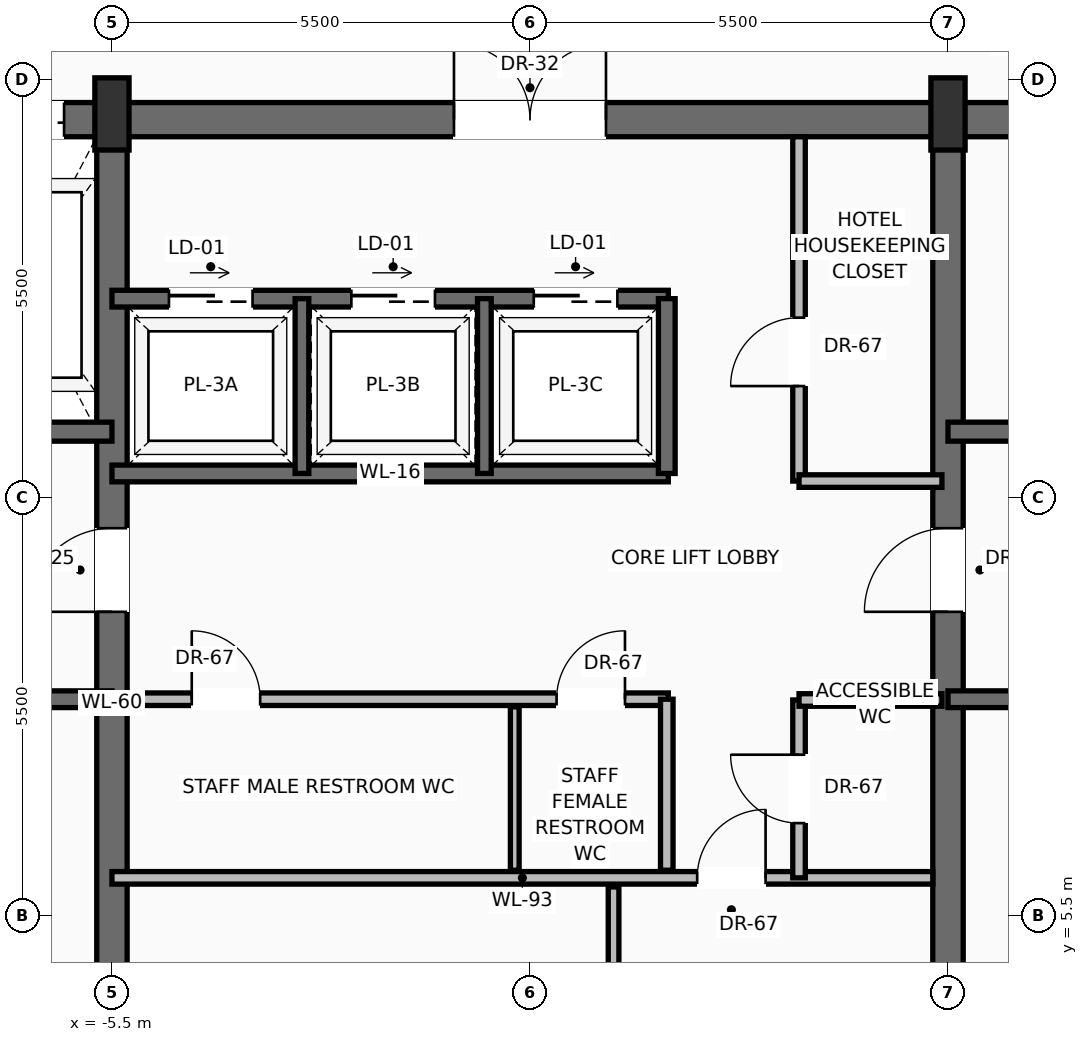
"""IFC4 building model, lengths in metres.
Left out: names, types, materials, properties, quantities, classifications, styles, units other than length and angle.
Written with IfcOpenShell. Run it as: python <this file> out.ifc"""

import sys

from ifc_helpers import new_model, si_unit, direction, frame, frame_2d, origin, origin_2d, place, context, subcontext, project, spatial, rectangle, extrude, source, transform, mapped, element, fill, save


model = new_model("IFC4")
c1 = context("Model", 3, precision=1e-05, world=origin(), true_north=direction((0.0, 1.0)))
c2 = subcontext(c1, "Body", "Model", "MODEL_VIEW")
j1 = project(units=[si_unit("LENGTHUNIT", "METRE"), si_unit("PLANEANGLEUNIT", "RADIAN")], contexts=[c1])
p1 = place(None, origin())
s1 = spatial("IfcSite", under=j1, at=p1, CompositionType="ELEMENT")
p2 = place(p1, origin())
s2 = spatial("IfcBuilding", under=s1, at=p2, CompositionType="ELEMENT")
p3 = place(p2, frame((0.0, 0.0, 266.1)))
s3 = spatial("IfcBuildingStorey", under=s2, at=p3, CompositionType="ELEMENT", Elevation=266.1)
p4 = place(p3, frame((-10.6, 15.975, 0.0), z_axis=(0.0, 0.0, 1.0), x_axis=(1.0, 0.0, 0.0)))
e1 = element("IfcWall", 1, at=p4, inside=s3, PredefinedType="SHEAR", context=c2, shape_type="SweptSolid", body=[
    extrude(rectangle(XDim=21.2, YDim=0.45, at=frame_2d((10.6, 0.0))), origin(), (0.0, 0.0, 1.0), 3.24),
])
p5 = place(p4, frame((3.17, 0.0, 0.0)))
e2 = element("IfcOpeningElement", 2, at=p5, cuts=e1, PredefinedType="OPENING", context=c2, shape_type="SweptSolid", body=[
    extrude(rectangle(XDim=1.3, YDim=2.3, at=frame_2d((0.65, 1.15))), frame((0.0, 0.235, 0.0), z_axis=(0.0, -1.0, 0.0), x_axis=(1.0, 0.0, 0.0)), (0.0, 0.0, 1.0), 0.47),
])
p6 = place(p4, frame((9.6, 0.0, 0.0)))
e3 = element("IfcOpeningElement", 3, at=p6, cuts=e1, PredefinedType="OPENING", context=c2, shape_type="SweptSolid", body=[
    extrude(rectangle(XDim=2.0, YDim=2.4, at=frame_2d((1.0, 1.2))), frame((0.0, 0.235, 0.0), z_axis=(0.0, -1.0, 0.0), x_axis=(1.0, 0.0, 0.0)), (0.0, 0.0, 1.0), 0.47),
])
p7 = place(p3, frame((-5.5, 0.625, 0.0), z_axis=(0.0, 0.0, 1.0), x_axis=(0.0, 1.0, 0.0)))
e4 = element("IfcWall", 4, at=p7, inside=s3, PredefinedType="SHEAR", context=c2, shape_type="SweptSolid", body=[
    extrude(rectangle(XDim=15.35, YDim=0.4, at=frame_2d((7.675, 0.0))), origin(), (0.0, 0.0, 1.0), 3.24),
])
p8 = place(p7, frame((8.875, 0.0, 0.0)))
e5 = element("IfcOpeningElement", 5, at=p8, cuts=e4, PredefinedType="OPENING", context=c2, shape_type="SweptSolid", body=[
    extrude(rectangle(XDim=1.1, YDim=2.2, at=frame_2d((0.55, 1.1))), frame((0.0, 0.21, 0.0), z_axis=(0.0, -1.0, 0.0), x_axis=(1.0, 0.0, 0.0)), (0.0, 0.0, 1.0), 0.42),
])
p9 = place(p3, frame((5.5, 0.625, 0.0), z_axis=(0.0, 0.0, 1.0), x_axis=(0.0, 1.0, 0.0)))
e6 = element("IfcWall", 6, at=p9, inside=s3, PredefinedType="SHEAR", context=c2, shape_type="SweptSolid", body=[
    extrude(rectangle(XDim=15.35, YDim=0.4, at=frame_2d((7.675, 0.0))), origin(), (0.0, 0.0, 1.0), 3.24),
])
p10 = place(p9, frame((8.875, 0.0, 0.0)))
e7 = element("IfcOpeningElement", 7, at=p10, cuts=e6, PredefinedType="OPENING", context=c2, shape_type="SweptSolid", body=[
    extrude(rectangle(XDim=1.1, YDim=2.2, at=frame_2d((0.55, 1.1))), frame((0.0, 0.21, 0.0), z_axis=(0.0, -1.0, 0.0), x_axis=(1.0, 0.0, 0.0)), (0.0, 0.0, 1.0), 0.42),
])
m1 = source(origin(), c2, "Body", "SweptSolid", [
    extrude(rectangle(XDim=0.45, YDim=0.95, at=origin_2d()), origin(), (0.0, 0.0, 1.0), 3.45),
])
for number, where, z_axis, x_axis in (
    (8, (-5.5, 16.05, 0.0), (0.0, 0.0, 1.0), (1.0, 0.0, 0.0)),
    (9, (5.5, 16.05, 0.0), (0.0, 0.0, 1.0), (1.0, 0.0, 0.0)),
):
    element("IfcColumn", number, at=place(p3, frame(where, z_axis=z_axis, x_axis=x_axis)), inside=s3, PredefinedType="PILASTER", context=c2, shape_type="MappedRepresentation", body=[
        mapped(m1, transform((0.0, 0.0, 0.0), scale=1.0)),
    ])
p11 = place(p3, frame((-5.5, 8.35, 0.0), z_axis=(0.0, 0.0, 1.0), x_axis=(-1.0, 0.0, 0.0)))
e10 = element("IfcWall", 10, at=p11, inside=s3, PredefinedType="SOLIDWALL", context=c2, shape_type="SweptSolid", body=[
    extrude(rectangle(XDim=4.65, YDim=0.22, at=frame_2d((2.325, 0.0))), origin(), (0.0, 0.0, 1.0), 3.24),
])
p12 = place(p11, frame((2.5, 0.0, 0.0)))
e11 = element("IfcOpeningElement", 11, at=p12, cuts=e10, PredefinedType="OPENING", context=c2, shape_type="SweptSolid", body=[
    extrude(rectangle(XDim=1.15, YDim=2.2, at=frame_2d((0.575, 1.1))), frame((0.0, 0.12, 0.0), z_axis=(0.0, -1.0, 0.0), x_axis=(1.0, 0.0, 0.0)), (0.0, 0.0, 1.0), 0.24),
])
p13 = place(p3, frame((-5.5, 11.87, 0.0), z_axis=(0.0, 0.0, 1.0), x_axis=(-1.0, 0.0, 0.0)))
e12 = element("IfcWall", 12, at=p13, inside=s3, PredefinedType="SOLIDWALL", context=c2, shape_type="SweptSolid", body=[
    extrude(rectangle(XDim=4.65, YDim=0.25, at=frame_2d((2.325, 0.0))), origin(), (0.0, 0.0, 1.0), 3.24),
])
p14 = place(p13, frame((2.95, 0.0, 0.0)))
e13 = element("IfcOpeningElement", 13, at=p14, cuts=e12, PredefinedType="OPENING", context=c2, shape_type="SweptSolid", body=[
    extrude(rectangle(XDim=1.2, YDim=2.25, at=frame_2d((0.6, 1.125))), frame((0.0, 0.135, 0.0), z_axis=(0.0, -1.0, 0.0), x_axis=(1.0, 0.0, 0.0)), (0.0, 0.0, 1.0), 0.27),
])
p15 = place(p3, frame((10.15, 8.35, 0.0), z_axis=(0.0, 0.0, 1.0), x_axis=(-1.0, 0.0, 0.0)))
e14 = element("IfcWall", 14, at=p15, inside=s3, PredefinedType="SOLIDWALL", context=c2, shape_type="SweptSolid", body=[
    extrude(rectangle(XDim=4.65, YDim=0.22, at=frame_2d((2.325, 0.0))), origin(), (0.0, 0.0, 1.0), 3.24),
])
p16 = place(p15, frame((1.0, 0.0, 0.0)))
e15 = element("IfcOpeningElement", 15, at=p16, cuts=e14, PredefinedType="OPENING", context=c2, shape_type="SweptSolid", body=[
    extrude(rectangle(XDim=1.15, YDim=2.2, at=frame_2d((0.575, 1.1))), frame((0.0, 0.12, 0.0), z_axis=(0.0, -1.0, 0.0), x_axis=(1.0, 0.0, 0.0)), (0.0, 0.0, 1.0), 0.24),
])
p17 = place(p3, frame((10.15, 11.87, 0.0), z_axis=(0.0, 0.0, 1.0), x_axis=(-1.0, 0.0, 0.0)))
e16 = element("IfcWall", 16, at=p17, inside=s3, PredefinedType="SOLIDWALL", context=c2, shape_type="SweptSolid", body=[
    extrude(rectangle(XDim=4.65, YDim=0.25, at=frame_2d((2.325, 0.0))), origin(), (0.0, 0.0, 1.0), 3.24),
])
p18 = place(p17, frame((0.5, 0.0, 0.0)))
e17 = element("IfcOpeningElement", 17, at=p18, cuts=e16, PredefinedType="OPENING", context=c2, shape_type="SweptSolid", body=[
    extrude(rectangle(XDim=1.2, YDim=2.25, at=frame_2d((0.6, 1.125))), frame((0.0, 0.135, 0.0), z_axis=(0.0, -1.0, 0.0), x_axis=(1.0, 0.0, 0.0)), (0.0, 0.0, 1.0), 0.27),
])
p19 = place(p3, frame((-5.5, 6.0, 0.0), z_axis=(0.0, 0.0, 1.0), x_axis=(1.0, 0.0, 0.0)))
e18 = element("IfcWall", 18, at=p19, inside=s3, PredefinedType="PARTITIONING", context=c2, shape_type="SweptSolid", body=[
    extrude(rectangle(XDim=10.8, YDim=0.165, at=frame_2d((5.4, 0.0))), origin(), (0.0, 0.0, 1.0), 3.232),
])
p20 = place(p19, frame((7.7, 0.0, 0.0)))
e19 = element("IfcOpeningElement", 19, at=p20, cuts=e18, PredefinedType="OPENING", context=c2, shape_type="SweptSolid", body=[
    extrude(rectangle(XDim=0.9, YDim=2.1, at=frame_2d((0.45, 1.05))), frame((0.0, 0.093, 0.0), z_axis=(0.0, -1.0, 0.0), x_axis=(1.0, 0.0, 0.0)), (0.0, 0.0, 1.0), 0.185),
])
p21 = place(p3, frame((1.1, 0.85, 0.0), z_axis=(0.0, 0.0, 1.0), x_axis=(0.0, 1.0, 0.0)))
e20 = element("IfcWall", 20, at=p21, inside=s3, PredefinedType="PARTITIONING", context=c2, shape_type="SweptSolid", body=[
    extrude(rectangle(XDim=5.03, YDim=0.14, at=frame_2d((2.515, 0.0))), origin(), (0.0, 0.0, 1.0), 3.232),
])
p22 = place(p21, frame((2.1, 0.0, 0.0)))
e21 = element("IfcOpeningElement", 21, at=p22, cuts=e20, PredefinedType="OPENING", context=c2, shape_type="SweptSolid", body=[
    extrude(rectangle(XDim=0.9, YDim=2.1, at=frame_2d((0.45, 1.05))), frame((0.0, 0.08, 0.0), z_axis=(0.0, -1.0, 0.0), x_axis=(1.0, 0.0, 0.0)), (0.0, 0.0, 1.0), 0.16),
])
p23 = place(p3, frame((3.54, 6.0, 0.0), z_axis=(0.0, 0.0, 1.0), x_axis=(0.0, 1.0, 0.0)))
e22 = element("IfcWall", 22, at=p23, inside=s3, PredefinedType="PARTITIONING", context=c2, shape_type="SweptSolid", body=[
    extrude(rectangle(XDim=2.34, YDim=0.165, at=frame_2d((1.17, 0.0))), origin(), (0.0, 0.0, 1.0), 3.232),
])
p24 = place(p23, frame((0.72, 0.0, 0.0)))
e23 = element("IfcOpeningElement", 23, at=p24, cuts=e22, PredefinedType="OPENING", context=c2, shape_type="SweptSolid", body=[
    extrude(rectangle(XDim=0.9, YDim=2.1, at=frame_2d((0.45, 1.05))), frame((0.0, 0.093, 0.0), z_axis=(0.0, -1.0, 0.0), x_axis=(1.0, 0.0, 0.0)), (0.0, 0.0, 1.0), 0.185),
])
p25 = place(p3, frame((3.54, 8.34, 0.0), z_axis=(0.0, 0.0, 1.0), x_axis=(1.0, 0.0, 0.0)))
e24 = element("IfcWall", 24, at=p25, inside=s3, PredefinedType="PARTITIONING", context=c2, shape_type="SweptSolid", body=[
    extrude(rectangle(XDim=1.88, YDim=0.165, at=frame_2d((0.94, 0.0))), origin(), (0.0, 0.0, 1.0), 3.232),
])
p26 = place(p3, frame((-5.3, 8.35, 0.0), z_axis=(0.0, 0.0, 1.0), x_axis=(1.0, 0.0, 0.0)))
e25 = element("IfcWall", 25, at=p26, inside=s3, PredefinedType="PARTITIONING", context=c2, shape_type="SweptSolid", body=[
    extrude(rectangle(XDim=7.12, YDim=0.165, at=frame_2d((3.56, 0.0))), origin(), (0.0, 0.0, 1.0), 3.232),
])
p27 = place(p26, frame((0.85, 0.0, 0.0)))
e26 = element("IfcOpeningElement", 26, at=p27, cuts=e25, PredefinedType="OPENING", context=c2, shape_type="SweptSolid", body=[
    extrude(rectangle(XDim=0.9, YDim=2.1, at=frame_2d((0.45, 1.05))), frame((0.0, 0.093, 0.0), z_axis=(0.0, -1.0, 0.0), x_axis=(1.0, 0.0, 0.0)), (0.0, 0.0, 1.0), 0.185),
])
p28 = place(p26, frame((5.65, 0.0, 0.0)))
e27 = element("IfcOpeningElement", 27, at=p28, cuts=e25, PredefinedType="OPENING", context=c2, shape_type="SweptSolid", body=[
    extrude(rectangle(XDim=0.9, YDim=2.1, at=frame_2d((0.45, 1.05))), frame((0.0, 0.093, 0.0), z_axis=(0.0, -1.0, 0.0), x_axis=(1.0, 0.0, 0.0)), (0.0, 0.0, 1.0), 0.185),
])
p29 = place(p3, frame((1.8, 6.1, 0.0), z_axis=(0.0, 0.0, 1.0), x_axis=(0.0, 1.0, 0.0)))
e28 = element("IfcWall", 28, at=p29, inside=s3, PredefinedType="PARTITIONING", context=c2, shape_type="SweptSolid", body=[
    extrude(rectangle(XDim=2.25, YDim=0.165, at=frame_2d((1.125, 0.0))), origin(), (0.0, 0.0, 1.0), 3.232),
])
p30 = place(p3, frame((-0.2, 6.1, 0.0), z_axis=(0.0, 0.0, 1.0), x_axis=(0.0, 1.0, 0.0)))
e29 = element("IfcWall", 29, at=p30, inside=s3, PredefinedType="PARTITIONING", context=c2, shape_type="SweptSolid", body=[
    extrude(rectangle(XDim=2.15, YDim=0.115, at=frame_2d((1.075, 0.0))), origin(), (0.0, 0.0, 1.0), 3.232),
])
p31 = place(p3, frame((-5.5, 11.32, 0.0), z_axis=(0.0, 0.0, 1.0), x_axis=(1.0, 0.0, 0.0)))
e30 = element("IfcWall", 30, at=p31, inside=s3, PredefinedType="SOLIDWALL", context=c2, shape_type="SweptSolid", body=[
    extrude(rectangle(XDim=7.32, YDim=0.22, at=frame_2d((3.66, 0.0))), origin(), (0.0, 0.0, 1.0), 3.24),
])
p32 = place(p3, frame((-5.5, 13.62, 0.0), z_axis=(0.0, 0.0, 1.0), x_axis=(1.0, 0.0, 0.0)))
e31 = element("IfcWall", 31, at=p32, inside=s3, PredefinedType="SOLIDWALL", context=c2, shape_type="SweptSolid", body=[
    extrude(rectangle(XDim=7.32, YDim=0.22, at=frame_2d((3.66, 0.0))), origin(), (0.0, 0.0, 1.0), 3.24),
])
p33 = place(p32, frame((0.75, 0.0, 0.0)))
e32 = element("IfcOpeningElement", 32, at=p33, cuts=e31, PredefinedType="OPENING", context=c2, shape_type="SweptSolid", body=[
    extrude(rectangle(XDim=1.1, YDim=2.2, at=frame_2d((0.55, 1.1))), frame((0.0, 0.12, 0.0), z_axis=(0.0, -1.0, 0.0), x_axis=(1.0, 0.0, 0.0)), (0.0, 0.0, 1.0), 0.24),
])
p34 = place(p32, frame((3.15, 0.0, 0.0)))
e33 = element("IfcOpeningElement", 33, at=p34, cuts=e31, PredefinedType="OPENING", context=c2, shape_type="SweptSolid", body=[
    extrude(rectangle(XDim=1.1, YDim=2.2, at=frame_2d((0.55, 1.1))), frame((0.0, 0.12, 0.0), z_axis=(0.0, -1.0, 0.0), x_axis=(1.0, 0.0, 0.0)), (0.0, 0.0, 1.0), 0.24),
])
p35 = place(p32, frame((5.55, 0.0, 0.0)))
e34 = element("IfcOpeningElement", 34, at=p35, cuts=e31, PredefinedType="OPENING", context=c2, shape_type="SweptSolid", body=[
    extrude(rectangle(XDim=1.1, YDim=2.2, at=frame_2d((0.55, 1.1))), frame((0.0, 0.12, 0.0), z_axis=(0.0, -1.0, 0.0), x_axis=(1.0, 0.0, 0.0)), (0.0, 0.0, 1.0), 0.24),
])
p36 = place(p3, frame((1.8, 11.32, 0.0), z_axis=(0.0, 0.0, 1.0), x_axis=(0.0, 1.0, 0.0)))
e35 = element("IfcWall", 35, at=p36, inside=s3, PredefinedType="SOLIDWALL", context=c2, shape_type="SweptSolid", body=[
    extrude(rectangle(XDim=2.3, YDim=0.22, at=frame_2d((1.15, 0.0))), origin(), (0.0, 0.0, 1.0), 3.24),
])
for number, where, z_axis, x_axis in (
    (36, (-3.0, 11.32, 0.0), (0.0, 0.0, 1.0), (0.0, 1.0, 0.0)),
    (37, (-0.6, 11.32, 0.0), (0.0, 0.0, 1.0), (0.0, 1.0, 0.0)),
):
    element("IfcWall", number, at=place(p3, frame(where, z_axis=z_axis, x_axis=x_axis)), inside=s3, PredefinedType="SOLIDWALL", context=c2, shape_type="SweptSolid", body=[
        extrude(rectangle(XDim=2.3, YDim=0.18, at=frame_2d((1.15, 0.0))), origin(), (0.0, 0.0, 1.0), 3.24),
    ])
p37 = place(p3, frame((3.54, 11.22, 0.0), z_axis=(0.0, 0.0, 1.0), x_axis=(0.0, 1.0, 0.0)))
e38 = element("IfcWall", 38, at=p37, inside=s3, PredefinedType="PARTITIONING", context=c2, shape_type="SweptSolid", body=[
    extrude(rectangle(XDim=4.53, YDim=0.165, at=frame_2d((2.265, 0.0))), origin(), (0.0, 0.0, 1.0), 3.232),
])
p38 = place(p37, frame((1.25, 0.0, 0.0)))
e39 = element("IfcOpeningElement", 39, at=p38, cuts=e38, PredefinedType="OPENING", context=c2, shape_type="SweptSolid", body=[
    extrude(rectangle(XDim=0.9, YDim=2.1, at=frame_2d((0.45, 1.05))), frame((0.0, 0.093, 0.0), z_axis=(0.0, -1.0, 0.0), x_axis=(1.0, 0.0, 0.0)), (0.0, 0.0, 1.0), 0.185),
])
p39 = place(p3, frame((3.54, 11.22, 0.0), z_axis=(0.0, 0.0, 1.0), x_axis=(1.0, 0.0, 0.0)))
e40 = element("IfcWall", 40, at=p39, inside=s3, PredefinedType="PARTITIONING", context=c2, shape_type="SweptSolid", body=[
    extrude(rectangle(XDim=1.88, YDim=0.165, at=frame_2d((0.94, 0.0))), origin(), (0.0, 0.0, 1.0), 3.232),
])
m2 = source(origin(), c2, "Body", "SweptSolid", [
    extrude(rectangle(XDim=1.1, YDim=2.2, at=frame_2d((0.55, 1.1))), frame((0.0, 0.025, 0.0), z_axis=(0.0, -1.0, 0.0), x_axis=(1.0, 0.0, 0.0)), (0.0, 0.0, 1.0), 0.05),
])
p40 = place(p8, origin())
e41 = element("IfcDoor", 41, at=p40, inside=s3, OperationType="SINGLE_SWING_LEFT", PredefinedType="DOOR", context=c2, shape_type="MappedRepresentation", body=[
    mapped(m2, transform((0.0, 0.0, 0.0), scale=1.0)),
])
fill(e5, e41)
m3 = source(origin(), c2, "Body", "SweptSolid", [
    extrude(rectangle(XDim=1.3, YDim=2.3, at=frame_2d((0.65, 1.15))), frame((0.0, 0.025, 0.0), z_axis=(0.0, -1.0, 0.0), x_axis=(1.0, 0.0, 0.0)), (0.0, 0.0, 1.0), 0.05),
])
p41 = place(p5, origin())
e42 = element("IfcDoor", 42, at=p41, inside=s3, OperationType="SLIDING_TO_RIGHT", PredefinedType="DOOR", context=c2, shape_type="MappedRepresentation", body=[
    mapped(m3, transform((0.0, 0.0, 0.0), scale=1.0)),
])
fill(e2, e42)
p42 = place(p10, origin())
e43 = element("IfcDoor", 43, at=p42, inside=s3, OperationType="SINGLE_SWING_LEFT", PredefinedType="DOOR", context=c2, shape_type="MappedRepresentation", body=[
    mapped(m2, transform((0.0, 0.0, 0.0), scale=1.0)),
])
fill(e7, e43)
m4 = source(origin(), c2, "Body", "SweptSolid", [
    extrude(rectangle(XDim=2.0, YDim=2.4, at=frame_2d((1.0, 1.2))), frame((0.0, 0.025, 0.0), z_axis=(0.0, -1.0, 0.0), x_axis=(1.0, 0.0, 0.0)), (0.0, 0.0, 1.0), 0.05),
])
p43 = place(p6, origin())
e44 = element("IfcDoor", 44, at=p43, inside=s3, OperationType="DOUBLE_DOOR_SINGLE_SWING", PredefinedType="DOOR", context=c2, shape_type="MappedRepresentation", body=[
    mapped(m4, transform((0.0, 0.0, 0.0), scale=1.0)),
])
fill(e3, e44)
m5 = source(origin(), c2, "Body", "SweptSolid", [
    extrude(rectangle(XDim=0.9, YDim=2.1, at=frame_2d((0.45, 1.05))), frame((0.0, 0.025, 0.0), z_axis=(0.0, -1.0, 0.0), x_axis=(1.0, 0.0, 0.0)), (0.0, 0.0, 1.0), 0.05),
])
p44 = place(p20, origin())
e45 = element("IfcDoor", 45, at=p44, inside=s3, OperationType="SINGLE_SWING_RIGHT", PredefinedType="DOOR", context=c2, shape_type="MappedRepresentation", body=[
    mapped(m5, transform((0.0, 0.0, 0.0), scale=1.0)),
])
fill(e19, e45)
p45 = place(p24, origin())
e46 = element("IfcDoor", 46, at=p45, inside=s3, OperationType="SINGLE_SWING_RIGHT", PredefinedType="DOOR", context=c2, shape_type="MappedRepresentation", body=[
    mapped(m5, transform((0.0, 0.0, 0.0), scale=1.0)),
])
fill(e23, e46)
p46 = place(p27, origin())
e47 = element("IfcDoor", 47, at=p46, inside=s3, OperationType="SINGLE_SWING_LEFT", PredefinedType="DOOR", context=c2, shape_type="MappedRepresentation", body=[
    mapped(m5, transform((0.0, 0.0, 0.0), scale=1.0)),
])
fill(e26, e47)
p47 = place(p28, origin())
e48 = element("IfcDoor", 48, at=p47, inside=s3, OperationType="SINGLE_SWING_RIGHT", PredefinedType="DOOR", context=c2, shape_type="MappedRepresentation", body=[
    mapped(m5, transform((0.0, 0.0, 0.0), scale=1.0)),
])
fill(e27, e48)
m6 = source(origin(), c2, "Body", "SweptSolid", [
    extrude(rectangle(XDim=1.1, YDim=2.2, at=frame_2d((0.55, 1.1))), frame((0.0, 0.025, 0.0), z_axis=(0.0, -1.0, 0.0), x_axis=(1.0, 0.0, 0.0)), (0.0, 0.0, 1.0), 0.05),
])
p48 = place(p33, origin())
e49 = element("IfcDoor", 49, at=p48, inside=s3, OperationType="SLIDING_TO_RIGHT", PredefinedType="DOOR", context=c2, shape_type="MappedRepresentation", body=[
    mapped(m6, transform((0.0, 0.0, 0.0), scale=1.0)),
])
fill(e32, e49)
p49 = place(p34, origin())
e50 = element("IfcDoor", 50, at=p49, inside=s3, OperationType="SLIDING_TO_RIGHT", PredefinedType="DOOR", context=c2, shape_type="MappedRepresentation", body=[
    mapped(m6, transform((0.0, 0.0, 0.0), scale=1.0)),
])
fill(e33, e50)
p50 = place(p35, origin())
e51 = element("IfcDoor", 51, at=p50, inside=s3, OperationType="SLIDING_TO_RIGHT", PredefinedType="DOOR", context=c2, shape_type="MappedRepresentation", body=[
    mapped(m6, transform((0.0, 0.0, 0.0), scale=1.0)),
])
fill(e34, e51)
p51 = place(p38, origin())
e52 = element("IfcDoor", 52, at=p51, inside=s3, OperationType="SINGLE_SWING_LEFT", PredefinedType="DOOR", context=c2, shape_type="MappedRepresentation", body=[
    mapped(m5, transform((0.0, 0.0, 0.0), scale=1.0)),
])
fill(e39, e52)
save(model, sys.argv[1])
